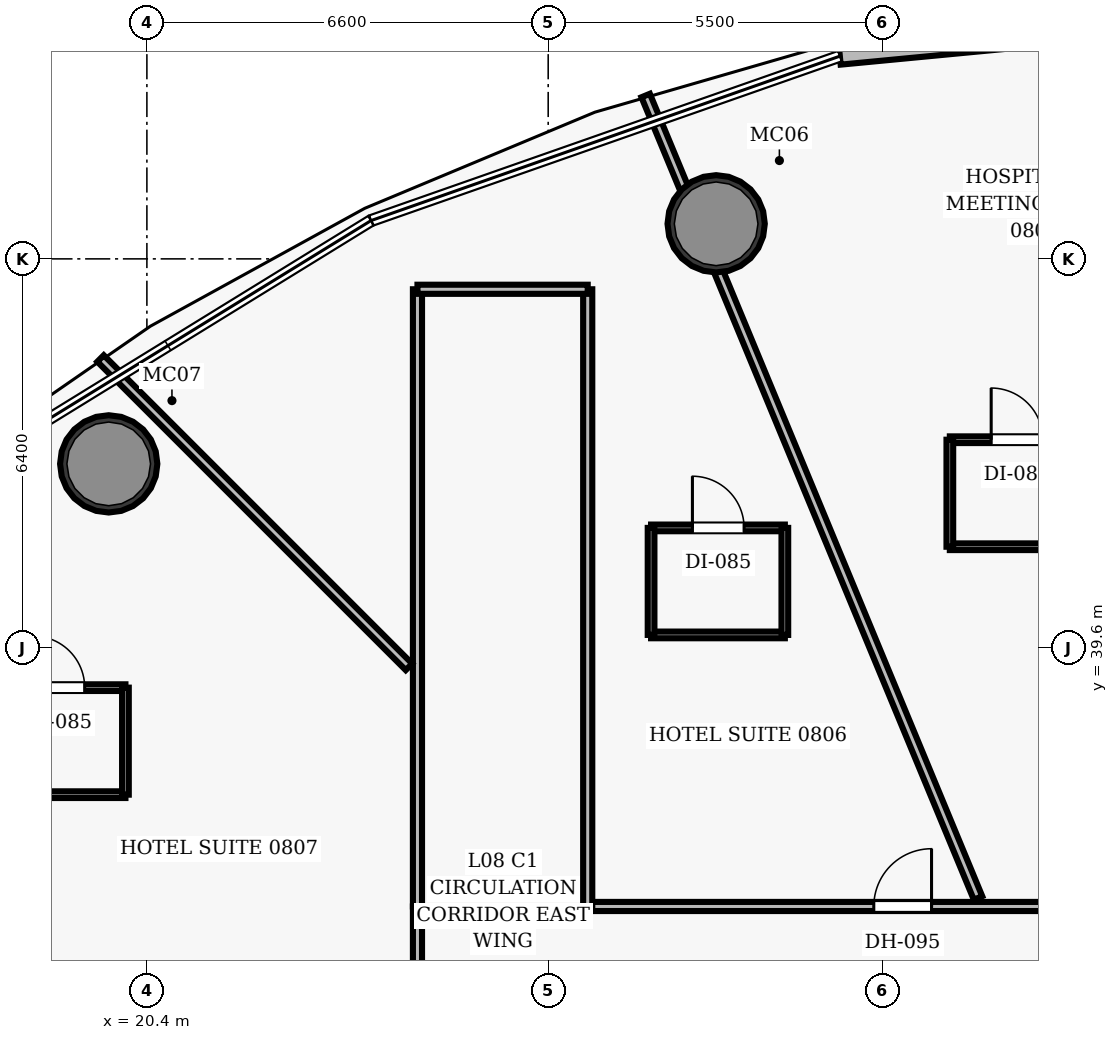
"""IFC4 building model, lengths in metres.
Left out: names, types, materials, properties, quantities, classifications, styles, units other than length and angle.
Written with IfcOpenShell. Run it as: python <this file> out.ifc"""

import sys

from ifc_helpers import new_model, si_unit, direction, frame, frame_2d, origin, origin_2d, place, context, subcontext, project, spatial, rectangle, hollow_circle, extrude, element, fill, save


model = new_model("IFC4")
c1 = context("Model", 3, precision=1e-05, world=origin(), true_north=direction((0.0, 1.0)))
c2 = subcontext(c1, "Body", "Model", "MODEL_VIEW")
j1 = project(units=[si_unit("LENGTHUNIT", "METRE"), si_unit("PLANEANGLEUNIT", "RADIAN")], contexts=[c1])
p1 = place(None, origin())
s1 = spatial("IfcSite", under=j1, at=p1, CompositionType="ELEMENT")
p2 = place(p1, origin())
s2 = spatial("IfcBuilding", under=s1, at=p2, CompositionType="ELEMENT")
p3 = place(p2, frame((0.0, 0.0, 44.9)))
s3 = spatial("IfcBuildingStorey", under=s2, at=p3, CompositionType="ELEMENT", Elevation=44.9)
for number, where, z_axis, x_axis in (
    (1, (29.762, 46.577, 0.0), (0.0, 0.0, 1.0), (1.0, 0.0, 0.0)),
    (2, (19.772, 42.629, 0.0), (0.0, 0.0, 1.0), (1.0, 0.0, 0.0)),
):
    element("IfcColumn", number, at=place(p3, frame(where, z_axis=z_axis, x_axis=x_axis)), inside=s3, PredefinedType="COLUMN", context=c2, shape_type="SweptSolid", body=[
        extrude(hollow_circle(Radius=0.8, WallThickness=0.06, at=origin_2d()), origin(), (0.0, 0.0, 1.0), 3.5),
    ])
p4 = place(p3, frame((27.65, 35.35, 0.0), z_axis=(0.0, 0.0, 1.0), x_axis=(1.0, 0.0, 0.0)))
e3 = element("IfcWall", 3, at=p4, inside=s3, PredefinedType="PARTITIONING", context=c2, shape_type="SweptSolid", body=[
    extrude(rectangle(XDim=23.5, YDim=0.15, at=frame_2d((11.75, 0.0))), origin(), (0.0, 0.0, 1.0), 2.6),
])
p5 = place(p4, frame((15.045, 0.0, 0.0)))
e4 = element("IfcOpeningElement", 4, at=p5, cuts=e3, PredefinedType="OPENING", context=c2, shape_type="SweptSolid", body=[
    extrude(rectangle(XDim=0.95, YDim=2.15, at=frame_2d((0.475, 1.075))), frame((0.0, 0.085, 0.0), z_axis=(0.0, -1.0, 0.0), x_axis=(1.0, 0.0, 0.0)), (0.0, 0.0, 1.0), 0.17),
])
p6 = place(p4, frame((11.159, 0.0, 0.0)))
e5 = element("IfcOpeningElement", 5, at=p6, cuts=e3, PredefinedType="OPENING", context=c2, shape_type="SweptSolid", body=[
    extrude(rectangle(XDim=0.95, YDim=2.15, at=frame_2d((0.475, 1.075))), frame((0.0, 0.085, 0.0), z_axis=(0.0, -1.0, 0.0), x_axis=(1.0, 0.0, 0.0)), (0.0, 0.0, 1.0), 0.17),
])
p7 = place(p4, frame((7.914, 0.0, 0.0)))
e6 = element("IfcOpeningElement", 6, at=p7, cuts=e3, PredefinedType="OPENING", context=c2, shape_type="SweptSolid", body=[
    extrude(rectangle(XDim=0.95, YDim=2.15, at=frame_2d((0.475, 1.075))), frame((0.0, 0.085, 0.0), z_axis=(0.0, -1.0, 0.0), x_axis=(1.0, 0.0, 0.0)), (0.0, 0.0, 1.0), 0.17),
])
p8 = place(p4, frame((4.705, 0.0, 0.0)))
e7 = element("IfcOpeningElement", 7, at=p8, cuts=e3, PredefinedType="OPENING", context=c2, shape_type="SweptSolid", body=[
    extrude(rectangle(XDim=0.95, YDim=2.15, at=frame_2d((0.475, 1.075))), frame((0.0, 0.085, 0.0), z_axis=(0.0, -1.0, 0.0), x_axis=(1.0, 0.0, 0.0)), (0.0, 0.0, 1.0), 0.17),
])
p9 = place(p3, frame((24.85, 19.45, 0.0), z_axis=(0.0, 0.0, 1.0), x_axis=(0.0, 1.0, 0.0)))
e8 = element("IfcWall", 8, at=p9, inside=s3, PredefinedType="PARTITIONING", context=c2, shape_type="SweptSolid", body=[
    extrude(rectangle(XDim=15.9, YDim=0.15, at=frame_2d((7.95, 0.0))), origin(), (0.0, 0.0, 1.0), 2.6),
])
p10 = place(p9, frame((12.728, 0.0, 0.0)))
e9 = element("IfcOpeningElement", 9, at=p10, cuts=e8, PredefinedType="OPENING", context=c2, shape_type="SweptSolid", body=[
    extrude(rectangle(XDim=0.95, YDim=2.15, at=frame_2d((0.475, 1.075))), frame((0.0, 0.085, 0.0), z_axis=(0.0, -1.0, 0.0), x_axis=(1.0, 0.0, 0.0)), (0.0, 0.0, 1.0), 0.17),
])
p11 = place(p9, frame((7.301, 0.0, 0.0)))
e10 = element("IfcOpeningElement", 10, at=p11, cuts=e8, PredefinedType="OPENING", context=c2, shape_type="SweptSolid", body=[
    extrude(rectangle(XDim=0.95, YDim=2.15, at=frame_2d((0.475, 1.075))), frame((0.0, 0.085, 0.0), z_axis=(0.0, -1.0, 0.0), x_axis=(1.0, 0.0, 0.0)), (0.0, 0.0, 1.0), 0.17),
])
p12 = place(p9, frame((4.849, 0.0, 0.0)))
e11 = element("IfcOpeningElement", 11, at=p12, cuts=e8, PredefinedType="OPENING", context=c2, shape_type="SweptSolid", body=[
    extrude(rectangle(XDim=0.95, YDim=2.15, at=frame_2d((0.475, 1.075))), frame((0.0, 0.085, 0.0), z_axis=(0.0, -1.0, 0.0), x_axis=(1.0, 0.0, 0.0)), (0.0, 0.0, 1.0), 0.17),
])
for number, where, z_axis, x_axis in (
    (12, (24.85, 35.35, 0.0), (0.0, 0.0, 1.0), (0.0, 1.0, 0.0)),
    (13, (27.65, 35.35, 0.0), (0.0, 0.0, 1.0), (0.0, 1.0, 0.0)),
):
    element("IfcWall", number, at=place(p3, frame(where, z_axis=z_axis, x_axis=x_axis)), inside=s3, PredefinedType="PARTITIONING", context=c2, shape_type="SweptSolid", body=[
        extrude(rectangle(XDim=10.15, YDim=0.15, at=frame_2d((5.075, 0.0))), origin(), (0.0, 0.0, 1.0), 2.6),
    ])
p13 = place(p3, frame((24.85, 45.5, 0.0), z_axis=(0.0, 0.0, 1.0), x_axis=(1.0, 0.0, 0.0)))
e14 = element("IfcWall", 14, at=p13, inside=s3, PredefinedType="PARTITIONING", context=c2, shape_type="SweptSolid", body=[
    extrude(rectangle(XDim=2.8, YDim=0.15, at=frame_2d((1.4, 0.0))), origin(), (0.0, 0.0, 1.0), 2.6),
])
p14 = place(p3, frame((34.069, 35.49, 0.0), z_axis=(0.0, 0.0, 1.0), x_axis=(-0.382676346633, 0.923882467486, 0.0)))
e15 = element("IfcWall", 15, at=p14, inside=s3, PredefinedType="PARTITIONING", context=c2, shape_type="SweptSolid", body=[
    extrude(rectangle(XDim=14.284, YDim=0.15, at=frame_2d((7.142, 0.0))), origin(), (0.0, 0.0, 1.0), 2.6),
])
p15 = place(p3, frame((24.71, 39.29, 0.0), z_axis=(0.0, 0.0, 1.0), x_axis=(-0.707106781187, 0.707106781187, 0.0)))
e16 = element("IfcWall", 16, at=p15, inside=s3, PredefinedType="PARTITIONING", context=c2, shape_type="SweptSolid", body=[
    extrude(rectangle(XDim=7.173, YDim=0.15, at=frame_2d((3.587, 0.0))), origin(), (0.0, 0.0, 1.0), 2.6),
])
p16 = place(p3, frame((24.71, 31.505, 0.0), z_axis=(0.0, 0.0, 1.0), x_axis=(-0.923878587867, 0.382685712931, 0.0)))
e17 = element("IfcWall", 17, at=p16, inside=s3, PredefinedType="PARTITIONING", context=c2, shape_type="SweptSolid", body=[
    extrude(rectangle(XDim=14.335, YDim=0.15, at=frame_2d((7.167, 0.0))), origin(), (0.0, 0.0, 1.0), 2.6),
])
p17 = place(p3, frame((33.605, 41.266, 0.0), z_axis=(0.0, 0.0, 1.0), x_axis=(1.0, 0.0, 0.0)))
e18 = element("IfcWall", 18, at=p17, inside=s3, PredefinedType="PARTITIONING", context=c2, shape_type="SweptSolid", body=[
    extrude(rectangle(XDim=2.2, YDim=0.11, at=frame_2d((1.1, 0.0))), origin(), (0.0, 0.0, 1.0), 2.6),
])
p18 = place(p3, frame((33.605, 43.026, 0.0), z_axis=(0.0, 0.0, 1.0), x_axis=(1.0, 0.0, 0.0)))
e19 = element("IfcWall", 19, at=p18, inside=s3, PredefinedType="PARTITIONING", context=c2, shape_type="SweptSolid", body=[
    extrude(rectangle(XDim=2.2, YDim=0.11, at=frame_2d((1.1, 0.0))), origin(), (0.0, 0.0, 1.0), 2.6),
])
p19 = place(p18, frame((0.68, 0.0, 0.0)))
e20 = element("IfcOpeningElement", 20, at=p19, cuts=e19, PredefinedType="OPENING", context=c2, shape_type="SweptSolid", body=[
    extrude(rectangle(XDim=0.85, YDim=2.1, at=frame_2d((0.425, 1.05))), frame((0.0, 0.065, 0.0), z_axis=(0.0, -1.0, 0.0), x_axis=(1.0, 0.0, 0.0)), (0.0, 0.0, 1.0), 0.13),
])
p20 = place(p3, frame((33.605, 41.266, 0.0), z_axis=(0.0, 0.0, 1.0), x_axis=(0.0, 1.0, 0.0)))
e21 = element("IfcWall", 21, at=p20, inside=s3, PredefinedType="PARTITIONING", context=c2, shape_type="SweptSolid", body=[
    extrude(rectangle(XDim=1.76, YDim=0.11, at=frame_2d((0.88, 0.0))), origin(), (0.0, 0.0, 1.0), 2.6),
])
p21 = place(p3, frame((28.692, 39.816, 0.0), z_axis=(0.0, 0.0, 1.0), x_axis=(1.0, 0.0, 0.0)))
e22 = element("IfcWall", 22, at=p21, inside=s3, PredefinedType="PARTITIONING", context=c2, shape_type="SweptSolid", body=[
    extrude(rectangle(XDim=2.2, YDim=0.11, at=frame_2d((1.1, 0.0))), origin(), (0.0, 0.0, 1.0), 2.6),
])
p22 = place(p3, frame((28.692, 41.576, 0.0), z_axis=(0.0, 0.0, 1.0), x_axis=(1.0, 0.0, 0.0)))
e23 = element("IfcWall", 23, at=p22, inside=s3, PredefinedType="PARTITIONING", context=c2, shape_type="SweptSolid", body=[
    extrude(rectangle(XDim=2.2, YDim=0.11, at=frame_2d((1.1, 0.0))), origin(), (0.0, 0.0, 1.0), 2.6),
])
p23 = place(p22, frame((0.68, 0.0, 0.0)))
e24 = element("IfcOpeningElement", 24, at=p23, cuts=e23, PredefinedType="OPENING", context=c2, shape_type="SweptSolid", body=[
    extrude(rectangle(XDim=0.85, YDim=2.1, at=frame_2d((0.425, 1.05))), frame((0.0, 0.065, 0.0), z_axis=(0.0, -1.0, 0.0), x_axis=(1.0, 0.0, 0.0)), (0.0, 0.0, 1.0), 0.13),
])
for number, where, z_axis, x_axis in (
    (25, (28.692, 39.816, 0.0), (0.0, 0.0, 1.0), (0.0, 1.0, 0.0)),
    (26, (30.892, 39.816, 0.0), (0.0, 0.0, 1.0), (0.0, 1.0, 0.0)),
):
    element("IfcWall", number, at=place(p3, frame(where, z_axis=z_axis, x_axis=x_axis)), inside=s3, PredefinedType="PARTITIONING", context=c2, shape_type="SweptSolid", body=[
        extrude(rectangle(XDim=1.76, YDim=0.11, at=frame_2d((0.88, 0.0))), origin(), (0.0, 0.0, 1.0), 2.6),
    ])
p24 = place(p3, frame((17.847, 37.189, 0.0), z_axis=(0.0, 0.0, 1.0), x_axis=(1.0, 0.0, 0.0)))
e27 = element("IfcWall", 27, at=p24, inside=s3, PredefinedType="PARTITIONING", context=c2, shape_type="SweptSolid", body=[
    extrude(rectangle(XDim=2.2, YDim=0.11, at=frame_2d((1.1, 0.0))), origin(), (0.0, 0.0, 1.0), 2.6),
])
p25 = place(p3, frame((17.847, 38.949, 0.0), z_axis=(0.0, 0.0, 1.0), x_axis=(1.0, 0.0, 0.0)))
e28 = element("IfcWall", 28, at=p25, inside=s3, PredefinedType="PARTITIONING", context=c2, shape_type="SweptSolid", body=[
    extrude(rectangle(XDim=2.2, YDim=0.11, at=frame_2d((1.1, 0.0))), origin(), (0.0, 0.0, 1.0), 2.6),
])
p26 = place(p25, frame((0.68, 0.0, 0.0)))
e29 = element("IfcOpeningElement", 29, at=p26, cuts=e28, PredefinedType="OPENING", context=c2, shape_type="SweptSolid", body=[
    extrude(rectangle(XDim=0.85, YDim=2.1, at=frame_2d((0.425, 1.05))), frame((0.0, 0.065, 0.0), z_axis=(0.0, -1.0, 0.0), x_axis=(1.0, 0.0, 0.0)), (0.0, 0.0, 1.0), 0.13),
])
p27 = place(p3, frame((20.047, 37.189, 0.0), z_axis=(0.0, 0.0, 1.0), x_axis=(0.0, 1.0, 0.0)))
e30 = element("IfcWall", 30, at=p27, inside=s3, PredefinedType="PARTITIONING", context=c2, shape_type="SweptSolid", body=[
    extrude(rectangle(XDim=1.76, YDim=0.11, at=frame_2d((0.88, 0.0))), origin(), (0.0, 0.0, 1.0), 2.6),
])
p28 = place(p3, frame((31.797, 49.333, 0.0), z_axis=(0.0, 0.0, 1.0), x_axis=(0.995468538386, 0.09509147745, 0.0)))
e31 = element("IfcWall", 31, at=p28, inside=s3, PredefinedType="SOLIDWALL", context=c2, shape_type="SweptSolid", body=[
    extrude(rectangle(XDim=8.241, YDim=0.28, at=frame_2d((4.121, 0.0))), origin(), (0.0, 0.0, 1.0), 3.25),
])
p29 = place(p19, origin())
e32 = element("IfcDoor", 32, at=p29, inside=s3, OperationType="SINGLE_SWING_LEFT", PredefinedType="DOOR", context=c2, shape_type="SweptSolid", body=[
    extrude(rectangle(XDim=0.85, YDim=2.1, at=frame_2d((0.425, 1.05))), frame((0.0, 0.025, 0.0), z_axis=(0.0, -1.0, 0.0), x_axis=(1.0, 0.0, 0.0)), (0.0, 0.0, 1.0), 0.05),
])
fill(e20, e32)
p30 = place(p8, origin())
e33 = element("IfcDoor", 33, at=p30, inside=s3, OperationType="SINGLE_SWING_RIGHT", PredefinedType="DOOR", context=c2, shape_type="SweptSolid", body=[
    extrude(rectangle(XDim=0.95, YDim=2.15, at=frame_2d((0.475, 1.075))), frame((0.0, 0.025, 0.0), z_axis=(0.0, -1.0, 0.0), x_axis=(1.0, 0.0, 0.0)), (0.0, 0.0, 1.0), 0.05),
])
fill(e7, e33)
p31 = place(p23, origin())
e34 = element("IfcDoor", 34, at=p31, inside=s3, OperationType="SINGLE_SWING_LEFT", PredefinedType="DOOR", context=c2, shape_type="SweptSolid", body=[
    extrude(rectangle(XDim=0.85, YDim=2.1, at=frame_2d((0.425, 1.05))), frame((0.0, 0.025, 0.0), z_axis=(0.0, -1.0, 0.0), x_axis=(1.0, 0.0, 0.0)), (0.0, 0.0, 1.0), 0.05),
])
fill(e24, e34)
p32 = place(p26, origin())
e35 = element("IfcDoor", 35, at=p32, inside=s3, OperationType="SINGLE_SWING_LEFT", PredefinedType="DOOR", context=c2, shape_type="SweptSolid", body=[
    extrude(rectangle(XDim=0.85, YDim=2.1, at=frame_2d((0.425, 1.05))), frame((0.0, 0.025, 0.0), z_axis=(0.0, -1.0, 0.0), x_axis=(1.0, 0.0, 0.0)), (0.0, 0.0, 1.0), 0.05),
])
fill(e29, e35)
save(model, sys.argv[1])
